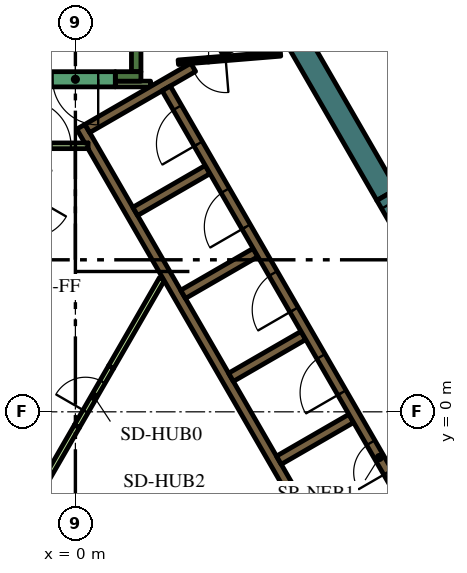
"""IFC4 building model, lengths in metres.
Left out: names, types, materials, properties, quantities, classifications, styles, units other than length and angle.
Written with IfcOpenShell. Run it as: python <this file> out.ifc"""

import sys

from ifc_helpers import new_model, si_unit, direction, frame, frame_2d, origin, place, context, subcontext, project, spatial, polyline, rectangle, outline, extrude, element, fill, save


model = new_model("IFC4")
c1 = context("Model", 3, precision=1e-05, world=origin(), true_north=direction((0.0, 1.0)))
c2 = subcontext(c1, "Body", "Model", "MODEL_VIEW")
j1 = project(units=[si_unit("LENGTHUNIT", "METRE"), si_unit("PLANEANGLEUNIT", "RADIAN")], contexts=[c1])
p1 = place(None, origin())
s1 = spatial("IfcSite", under=j1, at=p1, CompositionType="ELEMENT")
p2 = place(p1, origin())
s2 = spatial("IfcBuilding", under=s1, at=p2, CompositionType="ELEMENT")
p3 = place(p2, frame((0.0, 0.0, 283.8)))
s3 = spatial("IfcBuildingStorey", under=s2, at=p3, CompositionType="ELEMENT", Elevation=283.8)
p4 = place(p3, frame((1.989, 16.456, 0.0), z_axis=(0.0, 0.0, 1.0), x_axis=(0.49999102663, -0.8660305845, 0.0)))
e1 = element("IfcWall", 1, at=p4, inside=s3, PredefinedType="SOLIDWALL", context=c2, shape_type="SweptSolid", body=[
    extrude(rectangle(XDim=12.406, YDim=0.6, at=frame_2d((6.203, 0.0))), origin(), (0.0, 0.0, 1.0), 4.2),
])
p5 = place(p3, frame((1.6, 8.95, 0.0), z_axis=(0.0, 0.0, 1.0), x_axis=(0.0, 1.0, 0.0)))
e2 = element("IfcWall", 2, at=p5, inside=s3, PredefinedType="SOLIDWALL", context=c2, shape_type="SweptSolid", body=[
    extrude(rectangle(XDim=6.8, YDim=0.25, at=frame_2d((3.4, 0.0))), origin(), (0.0, 0.0, 1.0), 4.2),
])
p6 = place(p3, frame((1.05, 8.825, 0.0), z_axis=(0.0, 0.0, 1.0), x_axis=(1.0, 0.0, 0.0)))
e3 = element("IfcWall", 3, at=p6, inside=s3, PredefinedType="SOLIDWALL", context=c2, shape_type="SweptSolid", body=[
    extrude(rectangle(XDim=0.675, YDim=0.25, at=frame_2d((0.337, 0.0))), origin(), (0.0, 0.0, 1.0), 4.2),
])
p7 = place(p3, origin())
e4 = element("IfcWall", 4, at=p7, inside=s3, PredefinedType="SOLIDWALL", context=c2, shape_type="SweptSolid", body=[
    extrude(outline(polyline([(0.332, 6.925), (0.335, 6.925), (0.335, 6.925), (0.335, 6.925), (0.335, 7.075), (0.335, 7.075), (0.335, 7.075), (0.245, 7.075), (0.035, 7.439), (0.252, 7.564), (0.377, 7.348), (1.512, 5.382), (1.637, 5.165), (2.221, 4.153), (2.771, 3.199), (2.896, 2.983), (3.138, 2.564), (4.031, 1.017), (4.156, 0.801), (5.292, -1.165), (5.417, -1.382), (6.073, -2.519), (6.552, -3.348), (6.677, -3.564), (6.46, -3.689), (0.332, 6.925)])), origin(), (0.0, 0.0, 1.0), 4.2),
])
p8 = place(p3, frame((3.1, 9.064, 0.0), z_axis=(0.0, 0.0, 1.0), x_axis=(-0.866030133475, -0.499991807846, 0.0)))
e5 = element("IfcWall", 5, at=p8, inside=s3, PredefinedType="SOLIDWALL", context=c2, shape_type="SweptSolid", body=[
    extrude(rectangle(XDim=3.217, YDim=0.25, at=frame_2d((1.608, 0.0))), origin(), (0.0, 0.0, 1.0), 4.2),
])
p9 = place(p3, frame((1.574, 5.274, 0.0), z_axis=(0.0, 0.0, 1.0), x_axis=(0.866028486751, 0.499994660107, 0.0)))
e6 = element("IfcWall", 6, at=p9, inside=s3, PredefinedType="SOLIDWALL", context=c2, shape_type="SweptSolid", body=[
    extrude(rectangle(XDim=2.2, YDim=0.25, at=frame_2d((1.1, 0.0))), origin(), (0.0, 0.0, 1.0), 4.2),
])
for number, where, z_axis, x_axis in (
    (7, (2.834, 3.091, 0.0), (0.0, 0.0, 1.0), (0.866, 0.5, 0.0)),
    (8, (4.094, 0.909, 0.0), (0.0, 0.0, 1.0), (0.866, 0.5, 0.0)),
    (9, (5.354, -1.274, 0.0), (0.0, 0.0, 1.0), (0.866, 0.5, 0.0)),
):
    element("IfcWall", number, at=place(p3, frame(where, z_axis=z_axis, x_axis=x_axis)), inside=s3, PredefinedType="SOLIDWALL", context=c2, shape_type="SweptSolid", body=[
        extrude(rectangle(XDim=2.2, YDim=0.25, at=frame_2d((1.1, 0.0))), origin(), (0.0, 0.0, 1.0), 4.2),
    ])
p10 = place(p3, frame((11.507, -0.631, 0.0), z_axis=(0.0, 0.0, 1.0), x_axis=(-0.866011447264, -0.500024172624, 0.0)))
e10 = element("IfcWall", 10, at=p10, inside=s3, PredefinedType="SOLIDWALL", context=c2, shape_type="SweptSolid", body=[
    extrude(rectangle(XDim=5.65, YDim=0.25, at=frame_2d((2.825, 0.0))), origin(), (0.0, 0.0, 1.0), 4.2),
])
p11 = place(p3, frame((3.83, 9.486, 0.0), z_axis=(0.0, 0.0, 1.0), x_axis=(0.865986202621, 0.500067892261, 0.0)))
e11 = element("IfcWall", 11, at=p11, inside=s3, PredefinedType="SOLIDWALL", context=c2, shape_type="SweptSolid", body=[
    extrude(rectangle(XDim=1.591, YDim=0.25, at=frame_2d((0.795, 0.0))), origin(), (0.0, 0.0, 1.0), 4.2),
])
for number, where, z_axis, x_axis in (
    (12, (0.941, 1.179, 0.0), (0.0, 0.0, 1.0), (0.5, 0.866, 0.0)),
    (13, (-1.295, -2.693, 0.0), (0.0, 0.0, 1.0), (0.5, 0.866, 0.0)),
):
    element("IfcWall", number, at=place(p3, frame(where, z_axis=z_axis, x_axis=x_axis)), inside=s3, PredefinedType="PARTITIONING", context=c2, shape_type="SweptSolid", body=[
        extrude(rectangle(XDim=2.672, YDim=0.15, at=frame_2d((1.336, 0.0))), origin(), (0.0, 0.0, 1.0), 3.55),
    ])
p12 = place(p3, frame((1.05, 8.625, 0.0), z_axis=(0.0, 0.0, 1.0), x_axis=(1.0, 0.0, 0.0)))
e14 = element("IfcWall", 14, at=p12, inside=s3, PredefinedType="PARTITIONING", context=c2, shape_type="SweptSolid", body=[
    extrude(rectangle(XDim=0.929, YDim=0.15, at=frame_2d((0.464, 0.0))), origin(), (0.0, 0.0, 1.0), 3.55),
])
p13 = place(p3, frame((8.565, -2.185, 0.0), z_axis=(0.0, 0.0, 1.0), x_axis=(-0.499997954832, 0.866026584559, 0.0)))
e15 = element("IfcWall", 15, at=p13, inside=s3, PredefinedType="SOLIDWALL", context=c2, shape_type="SweptSolid", body=[
    extrude(rectangle(XDim=12.35, YDim=0.25, at=frame_2d((6.175, 0.0))), origin(), (0.0, 0.0, 1.0), 4.2),
])
p14 = place(p13, frame((0.685, 0.0, 0.0)))
e16 = element("IfcOpeningElement", 16, at=p14, cuts=e15, PredefinedType="OPENING", context=c2, shape_type="SweptSolid", body=[
    extrude(rectangle(XDim=0.9, YDim=2.1, at=frame_2d((0.45, 1.05))), frame((0.0, 0.135, 0.0), z_axis=(0.0, -1.0, 0.0), x_axis=(1.0, 0.0, 0.0)), (0.0, 0.0, 1.0), 0.27),
])
p15 = place(p13, frame((3.105, 0.0, 0.0)))
e17 = element("IfcOpeningElement", 17, at=p15, cuts=e15, PredefinedType="OPENING", context=c2, shape_type="SweptSolid", body=[
    extrude(rectangle(XDim=1.1, YDim=2.1, at=frame_2d((0.55, 1.05))), frame((0.0, 0.135, 0.0), z_axis=(0.0, -1.0, 0.0), x_axis=(1.0, 0.0, 0.0)), (0.0, 0.0, 1.0), 0.27),
])
p16 = place(p13, frame((5.625, 0.0, 0.0)))
e18 = element("IfcOpeningElement", 18, at=p16, cuts=e15, PredefinedType="OPENING", context=c2, shape_type="SweptSolid", body=[
    extrude(rectangle(XDim=1.1, YDim=2.1, at=frame_2d((0.55, 1.05))), frame((0.0, 0.135, 0.0), z_axis=(0.0, -1.0, 0.0), x_axis=(1.0, 0.0, 0.0)), (0.0, 0.0, 1.0), 0.27),
])
p17 = place(p13, frame((8.145, 0.0, 0.0)))
e19 = element("IfcOpeningElement", 19, at=p17, cuts=e15, PredefinedType="OPENING", context=c2, shape_type="SweptSolid", body=[
    extrude(rectangle(XDim=1.1, YDim=2.1, at=frame_2d((0.55, 1.05))), frame((0.0, 0.135, 0.0), z_axis=(0.0, -1.0, 0.0), x_axis=(1.0, 0.0, 0.0)), (0.0, 0.0, 1.0), 0.27),
])
p18 = place(p13, frame((10.665, 0.0, 0.0)))
e20 = element("IfcOpeningElement", 20, at=p18, cuts=e15, PredefinedType="OPENING", context=c2, shape_type="SweptSolid", body=[
    extrude(rectangle(XDim=1.1, YDim=2.1, at=frame_2d((0.55, 1.05))), frame((0.0, 0.135, 0.0), z_axis=(0.0, -1.0, 0.0), x_axis=(1.0, 0.0, 0.0)), (0.0, 0.0, 1.0), 0.27),
])
p19 = place(p3, frame((1.05, 8.75, 0.0), z_axis=(0.0, 0.0, 1.0), x_axis=(-1.0, 0.0, 0.0)))
e21 = element("IfcWall", 21, at=p19, inside=s3, PredefinedType="SOLIDWALL", context=c2, shape_type="SweptSolid", body=[
    extrude(rectangle(XDim=2.1, YDim=0.4, at=frame_2d((1.05, 0.0))), origin(), (0.0, 0.0, 1.0), 4.2),
])
p20 = place(p19, frame((0.45, 0.0, 0.0)))
e22 = element("IfcOpeningElement", 22, at=p20, cuts=e21, PredefinedType="OPENING", context=c2, shape_type="SweptSolid", body=[
    extrude(rectangle(XDim=1.2, YDim=2.1, at=frame_2d((0.6, 1.05))), frame((0.0, 0.21, 0.0), z_axis=(0.0, -1.0, 0.0), x_axis=(1.0, 0.0, 0.0)), (0.0, 0.0, 1.0), 0.42),
])
p21 = place(p3, frame((5.398, 9.419, 0.0), z_axis=(0.0, 0.0, 1.0), x_axis=(-0.996653416376, -0.081743303248, 0.0)))
e23 = element("IfcWall", 23, at=p21, inside=s3, PredefinedType="PARTITIONING", context=c2, shape_type="SweptSolid", body=[
    extrude(rectangle(XDim=2.7, YDim=0.12, at=frame_2d((1.35, 0.0))), origin(), (0.0, 0.0, 1.0), 3.55),
])
p22 = place(p21, frame((1.45, 0.0, 0.0)))
e24 = element("IfcOpeningElement", 24, at=p22, cuts=e23, PredefinedType="OPENING", context=c2, shape_type="SweptSolid", body=[
    extrude(rectangle(XDim=0.9, YDim=2.1, at=frame_2d((0.45, 1.05))), frame((0.0, 0.07, 0.0), z_axis=(0.0, -1.0, 0.0), x_axis=(1.0, 0.0, 0.0)), (0.0, 0.0, 1.0), 0.14),
])
p23 = place(p3, frame((-1.765, 7.0, 0.0), z_axis=(0.0, 0.0, 1.0), x_axis=(1.0, 0.0, 0.0)))
e25 = element("IfcWall", 25, at=p23, inside=s3, PredefinedType="PARTITIONING", context=c2, shape_type="SweptSolid", body=[
    extrude(rectangle(XDim=2.1, YDim=0.15, at=frame_2d((1.05, 0.0))), origin(), (0.0, 0.0, 1.0), 3.55),
])
p24 = place(p23, frame((0.45, 0.0, 0.0)))
e26 = element("IfcOpeningElement", 26, at=p24, cuts=e25, PredefinedType="OPENING", context=c2, shape_type="SweptSolid", body=[
    extrude(rectangle(XDim=1.2, YDim=2.1, at=frame_2d((0.6, 1.05))), frame((0.0, 0.085, 0.0), z_axis=(0.0, -1.0, 0.0), x_axis=(1.0, 0.0, 0.0)), (0.0, 0.0, 1.0), 0.17),
])
p25 = place(p3, frame((8.192, 5.711, 0.0), z_axis=(0.0, 0.0, 1.0), x_axis=(0.500062241894, -0.865989465428, 0.0)))
e27 = element("IfcWall", 27, at=p25, inside=s3, PredefinedType="SOLIDWALL", context=c2, shape_type="SweptSolid", body=[
    extrude(rectangle(XDim=1.7, YDim=0.6, at=frame_2d((0.85, 0.0))), origin(), (0.0, 0.0, 1.0), 4.2),
])
p26 = place(p25, frame((0.25, 0.0, 0.0)))
e28 = element("IfcOpeningElement", 28, at=p26, cuts=e27, PredefinedType="OPENING", context=c2, shape_type="SweptSolid", body=[
    extrude(rectangle(XDim=1.2, YDim=2.1, at=frame_2d((0.6, 1.05))), frame((0.0, 0.31, 0.0), z_axis=(0.0, -1.0, 0.0), x_axis=(1.0, 0.0, 0.0)), (0.0, 0.0, 1.0), 0.62),
])
p27 = place(p3, frame((0.041, -0.379, 0.0), z_axis=(0.0, 0.0, 1.0), x_axis=(0.499961193289, 0.866047807691, 0.0)))
e29 = element("IfcWall", 29, at=p27, inside=s3, PredefinedType="PARTITIONING", context=c2, shape_type="SweptSolid", body=[
    extrude(rectangle(XDim=1.8, YDim=0.15, at=frame_2d((0.9, 0.0))), origin(), (0.0, 0.0, 1.0), 3.55),
])
p28 = place(p27, frame((0.45, 0.0, 0.0)))
e30 = element("IfcOpeningElement", 30, at=p28, cuts=e29, PredefinedType="OPENING", context=c2, shape_type="SweptSolid", body=[
    extrude(rectangle(XDim=0.9, YDim=2.1, at=frame_2d((0.45, 1.05))), frame((0.0, 0.085, 0.0), z_axis=(0.0, -1.0, 0.0), x_axis=(1.0, 0.0, 0.0)), (0.0, 0.0, 1.0), 0.17),
])
p29 = place(p3, frame((8.792, 8.873, 0.0), z_axis=(0.0, 0.0, 1.0), x_axis=(-0.499992600721, 0.866029675718, 0.0)))
e31 = element("IfcWall", 31, at=p29, inside=s3, PredefinedType="PARTITIONING", context=c2, shape_type="SweptSolid", body=[
    extrude(rectangle(XDim=2.712, YDim=0.2, at=frame_2d((1.356, 0.0))), origin(), (0.0, 0.0, 1.0), 3.55),
])
p30 = place(p14, origin())
e32 = element("IfcDoor", 32, at=p30, inside=s3, OperationType="SINGLE_SWING_LEFT", PredefinedType="DOOR", context=c2, shape_type="SweptSolid", body=[
    extrude(rectangle(XDim=0.9, YDim=2.1, at=frame_2d((0.45, 1.05))), frame((0.0, 0.025, 0.0), z_axis=(0.0, -1.0, 0.0), x_axis=(1.0, 0.0, 0.0)), (0.0, 0.0, 1.0), 0.05),
])
fill(e16, e32)
p31 = place(p15, origin())
e33 = element("IfcDoor", 33, at=p31, inside=s3, OperationType="DOUBLE_DOOR_SLIDING", PredefinedType="DOOR", context=c2, shape_type="SweptSolid", body=[
    extrude(rectangle(XDim=1.1, YDim=2.1, at=frame_2d((0.55, 1.05))), frame((0.0, 0.025, 0.0), z_axis=(0.0, -1.0, 0.0), x_axis=(1.0, 0.0, 0.0)), (0.0, 0.0, 1.0), 0.05),
])
fill(e17, e33)
p32 = place(p16, origin())
e34 = element("IfcDoor", 34, at=p32, inside=s3, OperationType="DOUBLE_DOOR_SLIDING", PredefinedType="DOOR", context=c2, shape_type="SweptSolid", body=[
    extrude(rectangle(XDim=1.1, YDim=2.1, at=frame_2d((0.55, 1.05))), frame((0.0, 0.025, 0.0), z_axis=(0.0, -1.0, 0.0), x_axis=(1.0, 0.0, 0.0)), (0.0, 0.0, 1.0), 0.05),
])
fill(e18, e34)
p33 = place(p17, origin())
e35 = element("IfcDoor", 35, at=p33, inside=s3, OperationType="DOUBLE_DOOR_SLIDING", PredefinedType="DOOR", context=c2, shape_type="SweptSolid", body=[
    extrude(rectangle(XDim=1.1, YDim=2.1, at=frame_2d((0.55, 1.05))), frame((0.0, 0.025, 0.0), z_axis=(0.0, -1.0, 0.0), x_axis=(1.0, 0.0, 0.0)), (0.0, 0.0, 1.0), 0.05),
])
fill(e19, e35)
p34 = place(p18, origin())
e36 = element("IfcDoor", 36, at=p34, inside=s3, OperationType="DOUBLE_DOOR_SLIDING", PredefinedType="DOOR", context=c2, shape_type="SweptSolid", body=[
    extrude(rectangle(XDim=1.1, YDim=2.1, at=frame_2d((0.55, 1.05))), frame((0.0, 0.025, 0.0), z_axis=(0.0, -1.0, 0.0), x_axis=(1.0, 0.0, 0.0)), (0.0, 0.0, 1.0), 0.05),
])
fill(e20, e36)
p35 = place(p20, origin())
e37 = element("IfcDoor", 37, at=p35, inside=s3, OperationType="SINGLE_SWING_LEFT", PredefinedType="DOOR", context=c2, shape_type="SweptSolid", body=[
    extrude(rectangle(XDim=1.2, YDim=2.1, at=frame_2d((0.6, 1.05))), frame((0.0, 0.025, 0.0), z_axis=(0.0, -1.0, 0.0), x_axis=(1.0, 0.0, 0.0)), (0.0, 0.0, 1.0), 0.05),
])
fill(e22, e37)
p36 = place(p22, origin())
e38 = element("IfcDoor", 38, at=p36, inside=s3, OperationType="SINGLE_SWING_LEFT", PredefinedType="DOOR", context=c2, shape_type="SweptSolid", body=[
    extrude(rectangle(XDim=0.9, YDim=2.1, at=frame_2d((0.45, 1.05))), frame((0.0, 0.025, 0.0), z_axis=(0.0, -1.0, 0.0), x_axis=(1.0, 0.0, 0.0)), (0.0, 0.0, 1.0), 0.05),
])
fill(e24, e38)
p37 = place(p24, origin())
e39 = element("IfcDoor", 39, at=p37, inside=s3, OperationType="SINGLE_SWING_LEFT", PredefinedType="DOOR", context=c2, shape_type="SweptSolid", body=[
    extrude(rectangle(XDim=1.2, YDim=2.1, at=frame_2d((0.6, 1.05))), frame((0.0, 0.025, 0.0), z_axis=(0.0, -1.0, 0.0), x_axis=(1.0, 0.0, 0.0)), (0.0, 0.0, 1.0), 0.05),
])
fill(e26, e39)
p38 = place(p28, origin())
e40 = element("IfcDoor", 40, at=p38, inside=s3, OperationType="SINGLE_SWING_LEFT", PredefinedType="DOOR", context=c2, shape_type="SweptSolid", body=[
    extrude(rectangle(XDim=0.9, YDim=2.1, at=frame_2d((0.45, 1.05))), frame((0.0, 0.025, 0.0), z_axis=(0.0, -1.0, 0.0), x_axis=(1.0, 0.0, 0.0)), (0.0, 0.0, 1.0), 0.05),
])
fill(e30, e40)
save(model, sys.argv[1])
